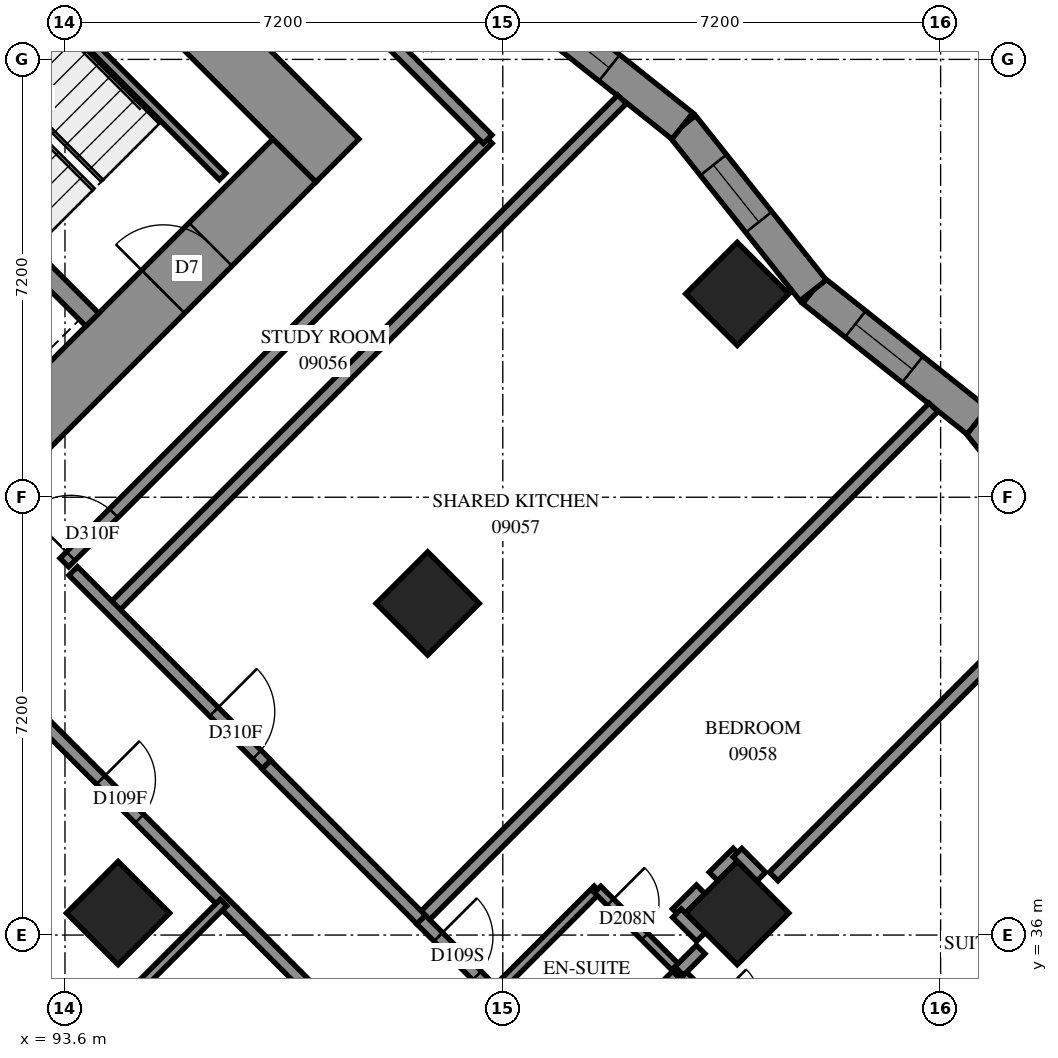
"""IFC4 building model, lengths in metres.
Left out: names, types, materials, properties, quantities, classifications, styles, units other than length and angle.
Written with IfcOpenShell. Run it as: python <this file> out.ifc"""

import sys

from ifc_helpers import new_model, si_unit, direction, frame, frame_2d, origin, origin_2d, place, context, subcontext, project, spatial, polyline, rectangle, outline, extrude, element, fill, save


model = new_model("IFC4")
c1 = context("Model", 3, precision=1e-05, world=origin(), true_north=direction((0.0, 1.0)))
c2 = subcontext(c1, "Body", "Model", "MODEL_VIEW")
j1 = project(units=[si_unit("LENGTHUNIT", "METRE"), si_unit("PLANEANGLEUNIT", "RADIAN")], contexts=[c1])
p1 = place(None, origin())
s1 = spatial("IfcSite", under=j1, at=p1, CompositionType="ELEMENT")
p2 = place(p1, origin())
s2 = spatial("IfcBuilding", under=s1, at=p2, CompositionType="ELEMENT")
p3 = place(p2, frame((0.0, 0.0, 37.2)))
s3 = spatial("IfcBuildingStorey", under=s2, at=p3, CompositionType="ELEMENT", Elevation=37.2)
for number, where, z_axis, x_axis in (
    (1, (104.656, 46.544, 0.0), (0.0, 0.0, 1.0), (0.707, -0.707, 0.0)),
    (2, (99.565, 41.453, 0.0), (0.0, 0.0, 1.0), (0.707, -0.707, 0.0)),
    (3, (94.474, 36.362, 0.0), (0.0, 0.0, 1.0), (0.707, -0.707, 0.0)),
    (4, (104.656, 36.362, 0.0), (0.0, 0.0, 1.0), (0.707, -0.707, 0.0)),
):
    element("IfcColumn", number, at=place(p3, frame(where, z_axis=z_axis, x_axis=x_axis)), inside=s3, PredefinedType="COLUMN", context=c2, shape_type="SweptSolid", body=[
        extrude(rectangle(XDim=1.2, YDim=1.2, at=origin_2d()), origin(), (0.0, 0.0, 1.0), 3.1),
    ])
p4 = place(p3, frame((86.483, 60.333, -0.3), z_axis=(0.0, 0.0, 1.0), x_axis=(0.70710983, -0.7071037324, 0.0)))
e5 = element("IfcWall", 5, at=p4, inside=s3, PredefinedType="SHEAR", context=c2, shape_type="SweptSolid", body=[
    extrude(rectangle(XDim=16.4, YDim=1.0, at=frame_2d((8.2, 0.0))), origin(), (0.0, 0.0, 1.0), 2.7),
])
p5 = place(p4, frame((11.0, 0.0, 0.3)))
e6 = element("IfcOpeningElement", 6, at=p5, cuts=e5, PredefinedType="OPENING", context=c2, shape_type="SweptSolid", body=[
    extrude(rectangle(XDim=0.8, YDim=2.1, at=frame_2d((0.4, 1.05))), frame((0.0, 0.51, 0.0), z_axis=(0.0, -1.0, 0.0), x_axis=(1.0, 0.0, 0.0)), (0.0, 0.0, 1.0), 1.02),
])
p6 = place(p3, frame((87.19, 38.554, -0.3), z_axis=(0.0, 0.0, 1.0), x_axis=(0.707103309, 0.7071102534, 0.0)))
e7 = element("IfcWall", 7, at=p6, inside=s3, PredefinedType="SHEAR", context=c2, shape_type="SweptSolid", body=[
    extrude(rectangle(XDim=14.4, YDim=1.0, at=frame_2d((7.2, 0.0))), origin(), (0.0, 0.0, 1.0), 2.7),
])
p7 = place(p6, frame((4.55, 0.0, 0.3)))
e8 = element("IfcOpeningElement", 8, at=p7, cuts=e7, PredefinedType="OPENING", context=c2, shape_type="SweptSolid", body=[
    extrude(rectangle(XDim=1.1, YDim=2.1, at=frame_2d((0.55, 1.05))), frame((0.0, 0.51, 0.0), z_axis=(0.0, -1.0, 0.0), x_axis=(1.0, 0.0, 0.0)), (0.0, 0.0, 1.0), 1.02),
])
p8 = place(p6, frame((11.35, 0.0, 0.3)))
e9 = element("IfcOpeningElement", 9, at=p8, cuts=e7, PredefinedType="OPENING", context=c2, shape_type="SweptSolid", body=[
    extrude(rectangle(XDim=1.1, YDim=2.1, at=frame_2d((0.55, 1.05))), frame((0.0, 0.51, 0.0), z_axis=(0.0, -1.0, 0.0), x_axis=(1.0, 0.0, 0.0)), (0.0, 0.0, 1.0), 1.02),
])
p9 = place(p3, frame((88.958, 51.211, 0.0), z_axis=(0.0, 0.0, 1.0), x_axis=(0.7070998367, -0.7071137256, 0.0)))
e10 = element("IfcWall", 10, at=p9, inside=s3, PredefinedType="SOLIDWALL", context=c2, shape_type="SweptSolid", body=[
    extrude(rectangle(XDim=7.2, YDim=0.3, at=frame_2d((3.6, 0.0))), origin(), (0.0, 0.0, 1.0), 3.1),
])
p10 = place(p3, frame((110.757, 41.749, 0.0), z_axis=(0.0, 0.0, 1.0), x_axis=(-0.6225211477, 0.7826029777, 0.0)))
e11 = element("IfcWall", 11, at=p10, inside=s3, PredefinedType="SOLIDWALL", context=c2, shape_type="SweptSolid", body=[
    extrude(outline(polyline([(0.031, -0.275), (3.485, -0.275), (3.423, 0.275), (-0.031, 0.275), (0.031, -0.275)])), origin(), (0.0, 0.0, 1.0), 3.1),
])
p11 = place(p10, frame((1.315, 0.0, 0.5)))
e12 = element("IfcOpeningElement", 12, at=p11, cuts=e11, PredefinedType="OPENING", context=c2, shape_type="SweptSolid", body=[
    extrude(rectangle(XDim=1.2, YDim=2.45, at=frame_2d((0.6, 1.225))), frame((0.0, 0.285, 0.0), z_axis=(0.0, -1.0, 0.0), x_axis=(1.0, 0.0, 0.0)), (0.0, 0.0, 1.0), 0.57),
])
p12 = place(p3, frame((108.607, 44.452, 0.0), z_axis=(0.0, 0.0, 1.0), x_axis=(-0.7826141976, 0.6225070424, 0.0)))
e13 = element("IfcWall", 13, at=p12, inside=s3, PredefinedType="SOLIDWALL", context=c2, shape_type="SweptSolid", body=[
    extrude(outline(polyline([(-0.031, -0.275), (3.423, -0.275), (3.485, 0.275), (0.031, 0.275), (-0.031, -0.275)])), origin(), (0.0, 0.0, 1.0), 3.1),
])
p13 = place(p12, frame((1.366, 0.0, 0.5)))
e14 = element("IfcOpeningElement", 14, at=p13, cuts=e13, PredefinedType="OPENING", context=c2, shape_type="SweptSolid", body=[
    extrude(rectangle(XDim=1.2, YDim=2.45, at=frame_2d((0.6, 1.225))), frame((0.0, 0.285, 0.0), z_axis=(0.0, -1.0, 0.0), x_axis=(1.0, 0.0, 0.0)), (0.0, 0.0, 1.0), 0.57),
])
p14 = place(p3, frame((105.904, 46.602, 0.0), z_axis=(0.0, 0.0, 1.0), x_axis=(-0.6225070424, 0.7826141976, 0.0)))
e15 = element("IfcWall", 15, at=p14, inside=s3, PredefinedType="SOLIDWALL", context=c2, shape_type="SweptSolid", body=[
    extrude(outline(polyline([(0.031, -0.275), (3.485, -0.275), (3.423, 0.275), (-0.031, 0.275), (0.031, -0.275)])), origin(), (0.0, 0.0, 1.0), 3.1),
])
p15 = place(p14, frame((1.435, 0.0, 0.5)))
e16 = element("IfcOpeningElement", 16, at=p15, cuts=e15, PredefinedType="OPENING", context=c2, shape_type="SweptSolid", body=[
    extrude(rectangle(XDim=1.2, YDim=2.45, at=frame_2d((0.6, 1.225))), frame((0.0, 0.285, 0.0), z_axis=(0.0, -1.0, 0.0), x_axis=(1.0, 0.0, 0.0)), (0.0, 0.0, 1.0), 0.57),
])
p16 = place(p3, frame((103.754, 49.305, 0.0), z_axis=(0.0, 0.0, 1.0), x_axis=(-0.7826141976, 0.6225070424, 0.0)))
e17 = element("IfcWall", 17, at=p16, inside=s3, PredefinedType="SOLIDWALL", context=c2, shape_type="SweptSolid", body=[
    extrude(outline(polyline([(-0.031, -0.275), (3.423, -0.275), (3.485, 0.275), (0.031, 0.275), (-0.031, -0.275)])), origin(), (0.0, 0.0, 1.0), 3.1),
])
p17 = place(p16, frame((1.535, 0.0, 0.5)))
e18 = element("IfcOpeningElement", 18, at=p17, cuts=e17, PredefinedType="OPENING", context=c2, shape_type="SweptSolid", body=[
    extrude(rectangle(XDim=1.2, YDim=2.45, at=frame_2d((0.6, 1.225))), frame((0.0, 0.285, 0.0), z_axis=(0.0, -1.0, 0.0), x_axis=(1.0, 0.0, 0.0)), (0.0, 0.0, 1.0), 0.57),
])
p18 = place(p3, frame((91.313, 53.354, 0.0), z_axis=(0.0, 0.0, 1.0), x_axis=(0.7071140275, -0.7070995348, 0.0)))
e19 = element("IfcWall", 19, at=p18, inside=s3, PredefinedType="PARTITIONING", context=c2, shape_type="SweptSolid", body=[
    extrude(rectangle(XDim=6.9, YDim=0.15, at=frame_2d((3.45, 0.0))), origin(), (0.0, 0.0, 1.0), 3.1),
])
p19 = place(p3, frame((99.459, 36.255, 0.0), z_axis=(0.0, 0.0, 1.0), x_axis=(0.7071907307, 0.7070228217, 0.0)))
e20 = element("IfcWall", 20, at=p19, inside=s3, PredefinedType="PARTITIONING", context=c2, shape_type="SweptSolid", body=[
    extrude(rectangle(XDim=11.911, YDim=0.2, at=frame_2d((5.956, 0.0))), origin(), (0.0, 0.0, 1.0), 3.1),
])
p20 = place(p3, frame((94.367, 41.349, 0.0), z_axis=(0.0, 0.0, 1.0), x_axis=(0.7071109931, 0.7071025693, 0.0)))
e21 = element("IfcWall", 21, at=p20, inside=s3, PredefinedType="PARTITIONING", context=c2, shape_type="SweptSolid", body=[
    extrude(rectangle(XDim=11.871, YDim=0.2, at=frame_2d((5.936, 0.0))), origin(), (0.0, 0.0, 1.0), 3.1),
])
p21 = place(p3, frame((93.59, 42.126, 0.0), z_axis=(0.0, 0.0, 1.0), x_axis=(0.7071067812, 0.7071067812, 0.0)))
e22 = element("IfcWall", 22, at=p21, inside=s3, PredefinedType="PARTITIONING", context=c2, shape_type="SweptSolid", body=[
    extrude(rectangle(XDim=9.849, YDim=0.2, at=frame_2d((4.924, 0.0))), origin(), (0.0, 0.0, 1.0), 3.1),
])
p22 = place(p21, frame((0.148, 0.0, 0.0)))
e23 = element("IfcOpeningElement", 23, at=p22, cuts=e22, PredefinedType="OPENING", context=c2, shape_type="SweptSolid", body=[
    extrude(rectangle(XDim=1.0, YDim=2.1, at=frame_2d((0.5, 1.05))), frame((0.0, 0.11, 0.0), z_axis=(0.0, -1.0, 0.0), x_axis=(1.0, 0.0, 0.0)), (0.0, 0.0, 1.0), 0.22),
])
p23 = place(p3, frame((92.243, 40.495, 0.0), z_axis=(0.0, 0.0, 1.0), x_axis=(0.7071067812, -0.7071067812, 0.0)))
e24 = element("IfcWall", 24, at=p23, inside=s3, PredefinedType="PARTITIONING", context=c2, shape_type="SweptSolid", body=[
    extrude(rectangle(XDim=8.101, YDim=0.2, at=frame_2d((4.05, 0.0))), origin(), (0.0, 0.0, 1.0), 3.1),
])
p24 = place(p23, frame((2.75, 0.0, 0.0)))
e25 = element("IfcOpeningElement", 25, at=p24, cuts=e24, PredefinedType="OPENING", context=c2, shape_type="SweptSolid", body=[
    extrude(rectangle(XDim=0.9, YDim=2.1, at=frame_2d((0.45, 1.05))), frame((0.0, 0.11, 0.0), z_axis=(0.0, -1.0, 0.0), x_axis=(1.0, 0.0, 0.0)), (0.0, 0.0, 1.0), 0.22),
])
p25 = place(p3, frame((99.455, 36.253, 0.0), z_axis=(0.0, 0.0, 1.0), x_axis=(0.7071067812, -0.7071067812, 0.0)))
e26 = element("IfcWall", 26, at=p25, inside=s3, PredefinedType="PARTITIONING", context=c2, shape_type="SweptSolid", body=[
    extrude(rectangle(XDim=7.201, YDim=0.2, at=frame_2d((3.601, 0.0))), origin(), (0.0, 0.0, 1.0), 3.1),
])
p26 = place(p25, frame((0.401, 0.0, 0.0)))
e27 = element("IfcOpeningElement", 27, at=p26, cuts=e26, PredefinedType="OPENING", context=c2, shape_type="SweptSolid", body=[
    extrude(rectangle(XDim=0.9, YDim=2.1, at=frame_2d((0.45, 1.05))), frame((0.0, 0.11, 0.0), z_axis=(0.0, -1.0, 0.0), x_axis=(1.0, 0.0, 0.0)), (0.0, 0.0, 1.0), 0.22),
])
p27 = place(p3, frame((105.255, 36.963, 0.0), z_axis=(0.0, 0.0, 1.0), x_axis=(0.7071067812, 0.7071067812, 0.0)))
e28 = element("IfcWall", 28, at=p27, inside=s3, PredefinedType="PARTITIONING", context=c2, shape_type="SweptSolid", body=[
    extrude(rectangle(XDim=5.504, YDim=0.2, at=frame_2d((2.752, 0.0))), origin(), (0.0, 0.0, 1.0), 3.1),
])
p28 = place(p3, frame((93.735, 41.987, 0.0), z_axis=(0.0, 0.0, 1.0), x_axis=(0.7071067812, -0.7071067812, 0.0)))
e29 = element("IfcWall", 29, at=p28, inside=s3, PredefinedType="PARTITIONING", context=c2, shape_type="SweptSolid", body=[
    extrude(rectangle(XDim=4.5, YDim=0.2, at=frame_2d((2.25, 0.0))), origin(), (0.0, 0.0, 1.0), 3.1),
])
p29 = place(p28, frame((3.274, 0.0, 0.0)))
e30 = element("IfcOpeningElement", 30, at=p29, cuts=e29, PredefinedType="OPENING", context=c2, shape_type="SweptSolid", body=[
    extrude(rectangle(XDim=1.0, YDim=2.1, at=frame_2d((0.5, 1.05))), frame((0.0, 0.11, 0.0), z_axis=(0.0, -1.0, 0.0), x_axis=(1.0, 0.0, 0.0)), (0.0, 0.0, 1.0), 0.22),
])
p30 = place(p3, frame((96.913, 38.801, 0.0), z_axis=(0.0, 0.0, 1.0), x_axis=(0.7068288851, -0.7073845681, 0.0)))
e31 = element("IfcWall", 31, at=p30, inside=s3, PredefinedType="PARTITIONING", context=c2, shape_type="SweptSolid", body=[
    extrude(rectangle(XDim=3.599, YDim=0.2, at=frame_2d((1.8, 0.0))), origin(), (0.0, 0.0, 1.0), 3.1),
])
p31 = place(p3, frame((98.783, 50.855, 0.0), z_axis=(0.0, 0.0, 1.0), x_axis=(0.7071067812, -0.7071067812, 0.0)))
e32 = element("IfcWall", 32, at=p31, inside=s3, PredefinedType="PARTITIONING", context=c2, shape_type="SweptSolid", body=[
    extrude(rectangle(XDim=2.5, YDim=0.2, at=frame_2d((1.25, 0.0))), origin(), (0.0, 0.0, 1.0), 3.1),
])
p32 = place(p3, frame((102.003, 33.711, 0.0), z_axis=(0.0, 0.0, 1.0), x_axis=(0.7071067812, 0.7071067812, 0.0)))
e33 = element("IfcWall", 33, at=p32, inside=s3, PredefinedType="PARTITIONING", context=c2, shape_type="SweptSolid", body=[
    extrude(rectangle(XDim=2.401, YDim=0.15, at=frame_2d((1.201, 0.0))), origin(), (0.0, 0.0, 1.0), 3.1),
])
for number, where, z_axis, x_axis in (
    (34, (94.511, 34.839, 0.0), (0.0, 0.0, 1.0), (0.708, 0.707, 0.0)),
    (35, (100.657, 35.057, 0.0), (0.0, 0.0, 1.0), (0.708, 0.707, 0.0)),
):
    element("IfcWall", number, at=place(p3, frame(where, z_axis=z_axis, x_axis=x_axis)), inside=s3, PredefinedType="PARTITIONING", context=c2, shape_type="SweptSolid", body=[
        extrude(rectangle(XDim=2.4, YDim=0.15, at=frame_2d((1.2, 0.0))), origin(), (0.0, 0.0, 1.0), 3.1),
    ])
p33 = place(p3, frame((103.701, 35.407, 0.0), z_axis=(0.0, 0.0, 1.0), x_axis=(0.7065800724, -0.7076330979, 0.0)))
e36 = element("IfcWall", 36, at=p33, inside=s3, PredefinedType="PARTITIONING", context=c2, shape_type="SweptSolid", body=[
    extrude(rectangle(XDim=1.899, YDim=0.15, at=frame_2d((0.95, 0.0))), origin(), (0.0, 0.0, 1.0), 3.1),
])
p34 = place(p33, frame((0.759, 0.0, 0.0)))
e37 = element("IfcOpeningElement", 37, at=p34, cuts=e36, PredefinedType="OPENING", context=c2, shape_type="SweptSolid", body=[
    extrude(rectangle(XDim=0.8, YDim=2.1, at=frame_2d((0.4, 1.05))), frame((0.0, 0.085, 0.0), z_axis=(0.0, -1.0, 0.0), x_axis=(1.0, 0.0, 0.0)), (0.0, 0.0, 1.0), 0.17),
])
p35 = place(p3, frame((102.358, 36.75, 0.0), z_axis=(0.0, 0.0, 1.0), x_axis=(0.7076330979, -0.7065800724, 0.0)))
e38 = element("IfcWall", 38, at=p35, inside=s3, PredefinedType="PARTITIONING", context=c2, shape_type="SweptSolid", body=[
    extrude(rectangle(XDim=1.899, YDim=0.15, at=frame_2d((0.95, 0.0))), origin(), (0.0, 0.0, 1.0), 3.1),
])
p36 = place(p35, frame((0.296, 0.0, 0.0)))
e39 = element("IfcOpeningElement", 39, at=p36, cuts=e38, PredefinedType="OPENING", context=c2, shape_type="SweptSolid", body=[
    extrude(rectangle(XDim=0.8, YDim=2.1, at=frame_2d((0.4, 1.05))), frame((0.0, 0.085, 0.0), z_axis=(0.0, -1.0, 0.0), x_axis=(1.0, 0.0, 0.0)), (0.0, 0.0, 1.0), 0.17),
])
for number, where, z_axis, x_axis in (
    (40, (103.661, 36.359, 0.0), (0.0, 0.0, 1.0), (0.707, 0.707, 0.0)),
    (41, (104.265, 36.963, 0.0), (0.0, 0.0, 1.0), (0.707, 0.707, 0.0)),
):
    element("IfcWall", number, at=place(p3, frame(where, z_axis=z_axis, x_axis=x_axis)), inside=s3, PredefinedType="PARTITIONING", context=c2, shape_type="SweptSolid", body=[
        extrude(rectangle(XDim=0.557, YDim=0.2, at=frame_2d((0.279, 0.0))), origin(), (0.0, 0.0, 1.0), 3.1),
    ])
for number, where, z_axis, x_axis in (
    (42, (104.659, 37.355, 0.0), (0.0, 0.0, 1.0), (0.705, -0.709, 0.0)),
    (43, (103.664, 36.36, 0.0), (0.0, 0.0, 1.0), (0.709, -0.705, 0.0)),
):
    element("IfcWall", number, at=place(p3, frame(where, z_axis=z_axis, x_axis=x_axis)), inside=s3, PredefinedType="PARTITIONING", context=c2, shape_type="SweptSolid", body=[
        extrude(rectangle(XDim=0.556, YDim=0.2, at=frame_2d((0.278, 0.0))), origin(), (0.0, 0.0, 1.0), 3.1),
    ])
p37 = place(p3, frame((103.701, 35.409, 0.0), z_axis=(0.0, 0.0, 1.0), x_axis=(0.7071067812, 0.7071067812, 0.0)))
e44 = element("IfcWall", 44, at=p37, inside=s3, PredefinedType="PARTITIONING", context=c2, shape_type="SweptSolid", body=[
    extrude(rectangle(XDim=0.501, YDim=0.2, at=frame_2d((0.25, 0.0))), origin(), (0.0, 0.0, 1.0), 3.1),
])
p38 = place(p13, origin())
e45 = element("IfcWindow", 45, at=p38, inside=s3, PartitioningType="SINGLE_PANEL", PredefinedType="WINDOW", context=c2, shape_type="SweptSolid", body=[
    extrude(rectangle(XDim=1.2, YDim=2.45, at=frame_2d((0.6, 1.225))), frame((0.0, 0.155, 0.0), z_axis=(0.0, -1.0, 0.0), x_axis=(1.0, 0.0, 0.0)), (0.0, 0.0, 1.0), 0.06),
])
fill(e14, e45)
p39 = place(p15, origin())
e46 = element("IfcWindow", 46, at=p39, inside=s3, PartitioningType="SINGLE_PANEL", PredefinedType="WINDOW", context=c2, shape_type="SweptSolid", body=[
    extrude(rectangle(XDim=1.2, YDim=2.45, at=frame_2d((0.6, 1.225))), frame((0.0, 0.155, 0.0), z_axis=(0.0, -1.0, 0.0), x_axis=(1.0, 0.0, 0.0)), (0.0, 0.0, 1.0), 0.06),
])
fill(e16, e46)
p40 = place(p17, origin())
e47 = element("IfcWindow", 47, at=p40, inside=s3, PartitioningType="SINGLE_PANEL", PredefinedType="WINDOW", context=c2, shape_type="SweptSolid", body=[
    extrude(rectangle(XDim=1.2, YDim=2.45, at=frame_2d((0.6, 1.225))), frame((0.0, 0.155, 0.0), z_axis=(0.0, -1.0, 0.0), x_axis=(1.0, 0.0, 0.0)), (0.0, 0.0, 1.0), 0.06),
])
fill(e18, e47)
p41 = place(p8, origin())
e48 = element("IfcDoor", 48, at=p41, inside=s3, OperationType="SINGLE_SWING_RIGHT", PredefinedType="DOOR", context=c2, shape_type="SweptSolid", body=[
    extrude(rectangle(XDim=1.1, YDim=2.1, at=frame_2d((0.55, 1.05))), frame((0.0, 0.025, 0.0), z_axis=(0.0, -1.0, 0.0), x_axis=(1.0, 0.0, 0.0)), (0.0, 0.0, 1.0), 0.05),
])
fill(e9, e48)
p42 = place(p22, origin())
e49 = element("IfcDoor", 49, at=p42, inside=s3, OperationType="SINGLE_SWING_LEFT", PredefinedType="DOOR", context=c2, shape_type="SweptSolid", body=[
    extrude(rectangle(XDim=1.0, YDim=2.1, at=frame_2d((0.5, 1.05))), frame((0.0, 0.025, 0.0), z_axis=(0.0, -1.0, 0.0), x_axis=(1.0, 0.0, 0.0)), (0.0, 0.0, 1.0), 0.05),
])
fill(e23, e49)
p43 = place(p29, origin())
e50 = element("IfcDoor", 50, at=p43, inside=s3, OperationType="SINGLE_SWING_RIGHT", PredefinedType="DOOR", context=c2, shape_type="SweptSolid", body=[
    extrude(rectangle(XDim=1.0, YDim=2.1, at=frame_2d((0.5, 1.05))), frame((0.0, 0.025, 0.0), z_axis=(0.0, -1.0, 0.0), x_axis=(1.0, 0.0, 0.0)), (0.0, 0.0, 1.0), 0.05),
])
fill(e30, e50)
p44 = place(p26, origin())
e51 = element("IfcDoor", 51, at=p44, inside=s3, OperationType="SINGLE_SWING_RIGHT", PredefinedType="DOOR", context=c2, shape_type="SweptSolid", body=[
    extrude(rectangle(XDim=0.9, YDim=2.1, at=frame_2d((0.45, 1.05))), frame((0.0, 0.025, 0.0), z_axis=(0.0, -1.0, 0.0), x_axis=(1.0, 0.0, 0.0)), (0.0, 0.0, 1.0), 0.05),
])
fill(e27, e51)
p45 = place(p36, origin())
e52 = element("IfcDoor", 52, at=p45, inside=s3, OperationType="SINGLE_SWING_RIGHT", PredefinedType="DOOR", context=c2, shape_type="SweptSolid", body=[
    extrude(rectangle(XDim=0.8, YDim=2.1, at=frame_2d((0.4, 1.05))), frame((0.0, 0.025, 0.0), z_axis=(0.0, -1.0, 0.0), x_axis=(1.0, 0.0, 0.0)), (0.0, 0.0, 1.0), 0.05),
])
fill(e39, e52)
p46 = place(p24, origin())
e53 = element("IfcDoor", 53, at=p46, inside=s3, OperationType="SINGLE_SWING_LEFT", PredefinedType="DOOR", context=c2, shape_type="SweptSolid", body=[
    extrude(rectangle(XDim=0.9, YDim=2.1, at=frame_2d((0.45, 1.05))), frame((0.0, 0.025, 0.0), z_axis=(0.0, -1.0, 0.0), x_axis=(1.0, 0.0, 0.0)), (0.0, 0.0, 1.0), 0.05),
])
fill(e25, e53)
save(model, sys.argv[1])
